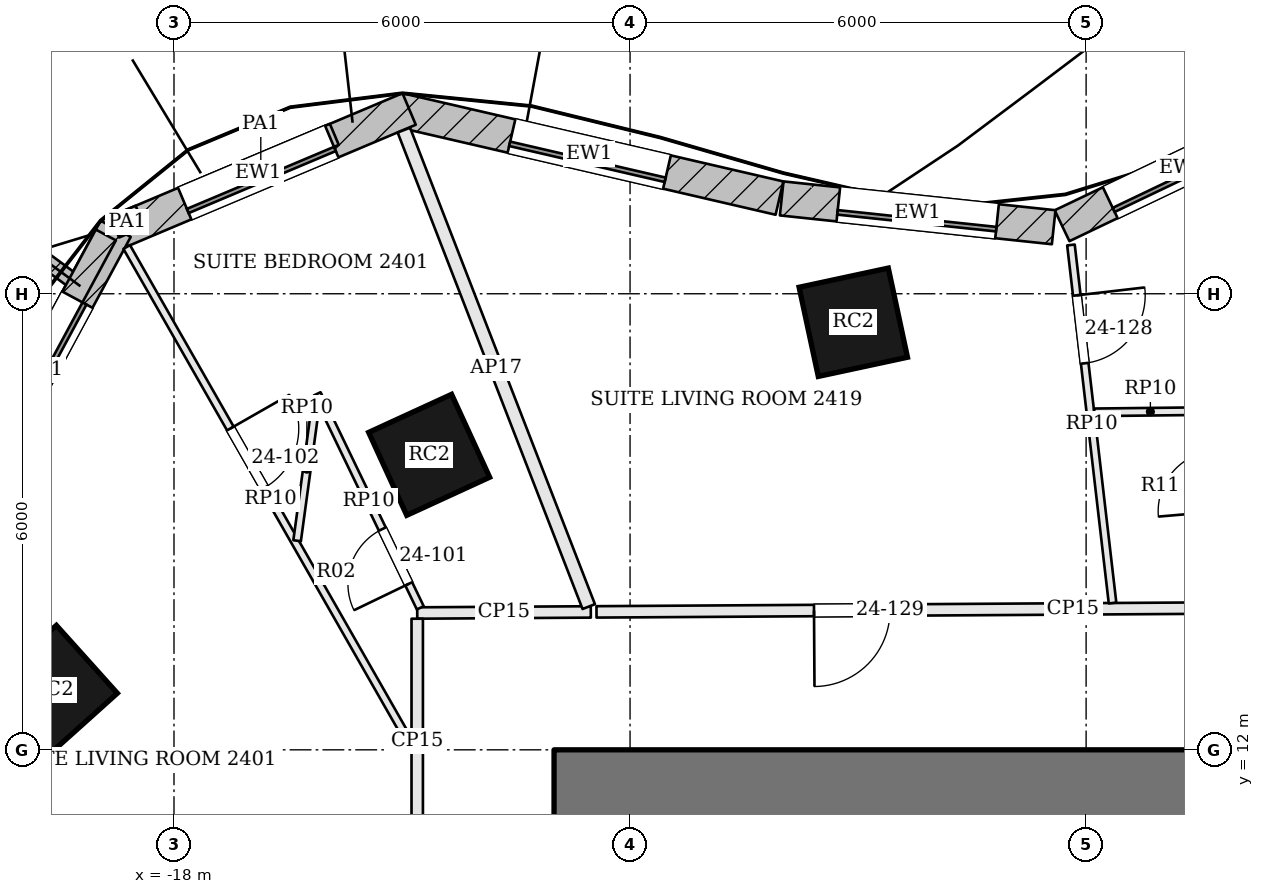
"""IFC4 building model, lengths in metres.
Left out: names, types, materials, properties, quantities, classifications, styles, units other than length and angle.
Written with IfcOpenShell. Run it as: python <this file> out.ifc"""

import sys

from ifc_helpers import new_model, si_unit, direction, frame, frame_2d, origin, origin_2d, place, context, subcontext, project, spatial, rectangle, extrude, element, fill, save


model = new_model("IFC4")
c1 = context("Model", 3, precision=1e-05, world=origin(), true_north=direction((0.0, 1.0)))
c2 = subcontext(c1, "Body", "Model", "MODEL_VIEW")
j1 = project(units=[si_unit("LENGTHUNIT", "METRE"), si_unit("PLANEANGLEUNIT", "RADIAN")], contexts=[c1])
p1 = place(None, origin())
s1 = spatial("IfcSite", under=j1, at=p1, CompositionType="ELEMENT")
p2 = place(p1, origin())
s2 = spatial("IfcBuilding", under=s1, at=p2, CompositionType="ELEMENT")
p3 = place(p2, frame((0.0, 0.0, 103.2)))
s3 = spatial("IfcBuildingStorey", under=s2, at=p3, CompositionType="ELEMENT", Elevation=103.2)
p4 = place(p3, frame((-13.0, 11.45, 0.0), z_axis=(0.0, 0.0, 1.0), x_axis=(1.0, 0.0, 0.0)))
e1 = element("IfcWall", 1, at=p4, inside=s3, PredefinedType="SHEAR", context=c2, shape_type="SweptSolid", body=[
    extrude(rectangle(XDim=26.0, YDim=1.1, at=frame_2d((13.0, 0.0))), origin(), (0.0, 0.0, 1.0), 3.6),
])
p5 = place(p4, frame((9.225, 0.0, 0.0)))
e2 = element("IfcOpeningElement", 2, at=p5, cuts=e1, PredefinedType="OPENING", context=c2, shape_type="SweptSolid", body=[
    extrude(rectangle(XDim=1.0, YDim=2.1, at=frame_2d((0.5, 1.05))), frame((0.0, 0.56, 0.0), z_axis=(0.0, -1.0, 0.0), x_axis=(1.0, 0.0, 0.0)), (0.0, 0.0, 1.0), 1.12),
])
p6 = place(p4, frame((12.225, 0.0, 0.0)))
e3 = element("IfcOpeningElement", 3, at=p6, cuts=e1, PredefinedType="OPENING", context=c2, shape_type="SweptSolid", body=[
    extrude(rectangle(XDim=0.7, YDim=2.1, at=frame_2d((0.35, 1.05))), frame((0.0, 0.56, 0.0), z_axis=(0.0, -1.0, 0.0), x_axis=(1.0, 0.0, 0.0)), (0.0, 0.0, 1.0), 1.12),
])
p7 = place(p4, frame((14.125, 0.0, 0.0)))
e4 = element("IfcOpeningElement", 4, at=p7, cuts=e1, PredefinedType="OPENING", context=c2, shape_type="SweptSolid", body=[
    extrude(rectangle(XDim=1.0, YDim=2.1, at=frame_2d((0.5, 1.05))), frame((0.0, 0.56, 0.0), z_axis=(0.0, -1.0, 0.0), x_axis=(1.0, 0.0, 0.0)), (0.0, 0.0, 1.0), 1.12),
])
p8 = place(p4, frame((15.65, 0.0, 0.0)))
e5 = element("IfcOpeningElement", 5, at=p8, cuts=e1, PredefinedType="OPENING", context=c2, shape_type="SweptSolid", body=[
    extrude(rectangle(XDim=1.0, YDim=2.1, at=frame_2d((0.5, 1.05))), frame((0.0, 0.56, 0.0), z_axis=(0.0, -1.0, 0.0), x_axis=(1.0, 0.0, 0.0)), (0.0, 0.0, 1.0), 1.12),
])
for number, where, z_axis, x_axis in (
    (6, (-9.063, 17.625, 0.0), (0.0, 0.0, 1.0), (-0.978, -0.21, 0.0)),
    (7, (-14.643, 15.881, 0.0), (0.0, 0.0, 1.0), (-0.909, -0.417, 0.0)),
    (8, (-19.593, 12.79, 0.0), (0.0, 0.0, 1.0), (-0.744, -0.668, 0.0)),
):
    element("IfcColumn", number, at=place(p3, frame(where, z_axis=z_axis, x_axis=x_axis)), inside=s3, PredefinedType="COLUMN", context=c2, shape_type="SweptSolid", body=[
        extrude(rectangle(XDim=1.2, YDim=1.2, at=origin_2d()), origin(), (0.0, 0.0, 1.0), 3.6),
    ])
p9 = place(p3, frame((-3.154, 20.406, 0.0), z_axis=(0.0, 0.0, 1.0), x_axis=(-0.902333313, -0.431038968367, 0.0)))
e9 = element("IfcWall", 9, at=p9, inside=s3, PredefinedType="SOLIDWALL", context=c2, shape_type="SweptSolid", body=[
    extrude(rectangle(XDim=3.505, YDim=0.45, at=frame_2d((1.753, 0.0))), origin(), (0.0, 0.0, 1.0), 3.4),
])
p10 = place(p9, frame((0.703, 0.0, 0.9)))
e10 = element("IfcOpeningElement", 10, at=p10, cuts=e9, PredefinedType="OPENING", context=c2, shape_type="SweptSolid", body=[
    extrude(rectangle(XDim=2.1, YDim=2.0, at=frame_2d((1.05, 1.0))), frame((0.0, 0.235, 0.0), z_axis=(0.0, -1.0, 0.0), x_axis=(1.0, 0.0, 0.0)), (0.0, 0.0, 1.0), 0.47),
])
p11 = place(p3, frame((-6.427, 18.875, 0.0), z_axis=(0.0, 0.0, 1.0), x_axis=(-0.994433468803, 0.10536638992, 0.0)))
e11 = element("IfcWall", 11, at=p11, inside=s3, PredefinedType="SOLIDWALL", context=c2, shape_type="SweptSolid", body=[
    extrude(rectangle(XDim=3.598, YDim=0.45, at=frame_2d((1.799, 0.0))), origin(), (0.0, 0.0, 1.0), 3.4),
])
p12 = place(p11, frame((0.749, 0.0, 0.9)))
e12 = element("IfcOpeningElement", 12, at=p12, cuts=e11, PredefinedType="OPENING", context=c2, shape_type="SweptSolid", body=[
    extrude(rectangle(XDim=2.1, YDim=2.0, at=frame_2d((1.05, 1.0))), frame((0.0, 0.235, 0.0), z_axis=(0.0, -1.0, 0.0), x_axis=(1.0, 0.0, 0.0)), (0.0, 0.0, 1.0), 0.47),
])
p13 = place(p3, frame((-10.034, 19.259, 0.0), z_axis=(0.0, 0.0, 1.0), x_axis=(-0.974223567844, 0.225584662283, 0.0)))
e13 = element("IfcWall", 13, at=p13, inside=s3, PredefinedType="SOLIDWALL", context=c2, shape_type="SweptSolid", body=[
    extrude(rectangle(XDim=5.139, YDim=0.45, at=frame_2d((2.569, 0.0))), origin(), (0.0, 0.0, 1.0), 3.4),
])
p14 = place(p13, frame((1.519, 0.0, 0.9)))
e14 = element("IfcOpeningElement", 14, at=p14, cuts=e13, PredefinedType="OPENING", context=c2, shape_type="SweptSolid", body=[
    extrude(rectangle(XDim=2.1, YDim=2.0, at=frame_2d((1.05, 1.0))), frame((0.0, 0.235, 0.0), z_axis=(0.0, -1.0, 0.0), x_axis=(1.0, 0.0, 0.0)), (0.0, 0.0, 1.0), 0.47),
])
p15 = place(p3, frame((-14.906, 20.431, 0.0), z_axis=(0.0, 0.0, 1.0), x_axis=(-0.921435803521, -0.388530642279, 0.0)))
e15 = element("IfcWall", 15, at=p15, inside=s3, PredefinedType="SOLIDWALL", context=c2, shape_type="SweptSolid", body=[
    extrude(rectangle(XDim=4.309, YDim=0.45, at=frame_2d((2.154, 0.0))), origin(), (0.0, 0.0, 1.0), 3.4),
])
p16 = place(p15, frame((1.104, 0.0, 0.9)))
e16 = element("IfcOpeningElement", 16, at=p16, cuts=e15, PredefinedType="OPENING", context=c2, shape_type="SweptSolid", body=[
    extrude(rectangle(XDim=2.1, YDim=2.0, at=frame_2d((1.05, 1.0))), frame((0.0, 0.235, 0.0), z_axis=(0.0, -1.0, 0.0), x_axis=(1.0, 0.0, 0.0)), (0.0, 0.0, 1.0), 0.47),
])
p17 = place(p3, frame((-18.767, 18.854, 0.0), z_axis=(0.0, 0.0, 1.0), x_axis=(-0.474475888716, -0.880268499395, 0.0)))
e17 = element("IfcWall", 17, at=p17, inside=s3, PredefinedType="SOLIDWALL", context=c2, shape_type="SweptSolid", body=[
    extrude(rectangle(XDim=4.219, YDim=0.45, at=frame_2d((2.11, 0.0))), origin(), (0.0, 0.0, 1.0), 3.4),
])
p18 = place(p17, frame((1.06, 0.0, 0.9)))
e18 = element("IfcOpeningElement", 18, at=p18, cuts=e17, PredefinedType="OPENING", context=c2, shape_type="SweptSolid", body=[
    extrude(rectangle(XDim=2.1, YDim=2.0, at=frame_2d((1.05, 1.0))), frame((0.0, 0.235, 0.0), z_axis=(0.0, -1.0, 0.0), x_axis=(1.0, 0.0, 0.0)), (0.0, 0.0, 1.0), 0.47),
])
p19 = place(p3, frame((-19.231, 18.099, 0.0), z_axis=(0.0, 0.0, 1.0), x_axis=(-0.806085538754, 0.591799040394, 0.0)))
e19 = element("IfcWall", 19, at=p19, inside=s3, PredefinedType="SOLIDWALL", context=c2, shape_type="SweptSolid", body=[
    extrude(rectangle(XDim=1.75, YDim=0.2, at=frame_2d((0.875, 0.0))), origin(), (0.0, 0.0, 1.0), 3.4),
])
p20 = place(p3, frame((-15.891, 20.097, 3.6), z_axis=(0.0, 0.0, 1.0), x_axis=(-0.921468908678, -0.388452121038, 0.0)))
e20 = element("IfcWall", 20, at=p20, inside=s3, PredefinedType="PARAPET", context=c2, shape_type="SweptSolid", body=[
    extrude(rectangle(XDim=2.099, YDim=0.3, at=frame_2d((1.05, 0.0))), origin(), (0.0, 0.0, 1.0), 1.1),
])
p21 = place(p3, frame((-18.446, 19.02, 3.6), z_axis=(0.0, 0.0, 1.0), x_axis=(-0.921356634102, -0.388718346358, 0.0)))
e21 = element("IfcWall", 21, at=p21, inside=s3, PredefinedType="PARAPET", context=c2, shape_type="SweptSolid", body=[
    extrude(rectangle(XDim=0.363, YDim=0.3, at=frame_2d((0.182, 0.0))), origin(), (0.0, 0.0, 1.0), 1.1),
])
p22 = place(p3, frame((-18.896, 18.773, 3.6), z_axis=(0.0, 0.0, 1.0), x_axis=(-0.474444905835, -0.880285198857, 0.0)))
e22 = element("IfcWall", 22, at=p22, inside=s3, PredefinedType="PARAPET", context=c2, shape_type="SweptSolid", body=[
    extrude(rectangle(XDim=4.05, YDim=0.3, at=frame_2d((2.025, 0.0))), origin(), (0.0, 0.0, 1.0), 1.1),
])
p23 = place(p3, frame((-12.516, 13.814, 0.0), z_axis=(0.0, 0.0, 1.0), x_axis=(-0.999980777107, -0.006200436719, 0.0)))
e23 = element("IfcWall", 23, at=p23, inside=s3, PredefinedType="PARTITIONING", context=c2, shape_type="SweptSolid", body=[
    extrude(rectangle(XDim=2.284, YDim=0.15, at=frame_2d((1.142, 0.0))), origin(), (0.0, 0.0, 1.0), 2.784),
])
p24 = place(p3, frame((-14.8, 13.725, 0.0), z_axis=(0.0, 0.0, 1.0), x_axis=(0.0, -1.0, 0.0)))
e24 = element("IfcWall", 24, at=p24, inside=s3, PredefinedType="PARTITIONING", context=c2, shape_type="SweptSolid", body=[
    extrude(rectangle(XDim=3.228, YDim=0.15, at=frame_2d((1.614, 0.0))), origin(), (0.0, 0.0, 1.0), 2.784),
])
p25 = place(p3, frame((-14.976, 20.153, 0.0), z_axis=(0.0, 0.0, 1.0), x_axis=(0.361736544099, -0.932280361621, 0.0)))
e25 = element("IfcWall", 25, at=p25, inside=s3, PredefinedType="PARTITIONING", context=c2, shape_type="SweptSolid", body=[
    extrude(rectangle(XDim=6.724, YDim=0.175, at=frame_2d((3.362, 0.0))), origin(), (0.0, 0.0, 1.0), 2.784),
])
p26 = place(p3, frame((0.098, 13.893, 0.0), z_axis=(0.0, 0.0, 1.0), x_axis=(-0.999980712681, -0.006210818468, 0.0)))
e26 = element("IfcWall", 26, at=p26, inside=s3, PredefinedType="PARTITIONING", context=c2, shape_type="SweptSolid", body=[
    extrude(rectangle(XDim=12.54, YDim=0.15, at=frame_2d((6.27, 0.0))), origin(), (0.0, 0.0, 1.0), 2.784),
])
p27 = place(p26, frame((8.678, 0.0, 0.0)))
e27 = element("IfcOpeningElement", 27, at=p27, cuts=e26, PredefinedType="OPENING", context=c2, shape_type="SweptSolid", body=[
    extrude(rectangle(XDim=1.0, YDim=2.1, at=frame_2d((0.5, 1.05))), frame((0.0, 0.085, 0.0), z_axis=(0.0, -1.0, 0.0), x_axis=(1.0, 0.0, 0.0)), (0.0, 0.0, 1.0), 0.17),
])
p28 = place(p3, frame((-18.622, 18.615, 0.0), z_axis=(0.0, 0.0, 1.0), x_axis=(0.495932236656, -0.868361224748, 0.0)))
e28 = element("IfcWall", 28, at=p28, inside=s3, PredefinedType="PARTITIONING", context=c2, shape_type="SweptSolid", body=[
    extrude(rectangle(XDim=7.632, YDim=0.1, at=frame_2d((3.816, 0.0))), origin(), (0.0, 0.0, 1.0), 2.784),
])
p29 = place(p28, frame((2.75, 0.0, 0.0)))
e29 = element("IfcOpeningElement", 29, at=p29, cuts=e28, PredefinedType="OPENING", context=c2, shape_type="SweptSolid", body=[
    extrude(rectangle(XDim=0.9, YDim=2.4, at=frame_2d((0.45, 1.2))), frame((0.0, 0.06, 0.0), z_axis=(0.0, -1.0, 0.0), x_axis=(1.0, 0.0, 0.0)), (0.0, 0.0, 1.0), 0.12),
])
p30 = place(p3, frame((-14.76, 13.868, 0.0), z_axis=(0.0, 0.0, 1.0), x_axis=(-0.434165602695, 0.900833075234, 0.0)))
e30 = element("IfcWall", 30, at=p30, inside=s3, PredefinedType="PARTITIONING", context=c2, shape_type="SweptSolid", body=[
    extrude(rectangle(XDim=3.125, YDim=0.1, at=frame_2d((1.562, 0.0))), origin(), (0.0, 0.0, 1.0), 2.784),
])
p31 = place(p30, frame((0.35, 0.0, 0.0)))
e31 = element("IfcOpeningElement", 31, at=p31, cuts=e30, PredefinedType="OPENING", context=c2, shape_type="SweptSolid", body=[
    extrude(rectangle(XDim=0.8, YDim=2.1, at=frame_2d((0.4, 1.05))), frame((0.0, 0.06, 0.0), z_axis=(0.0, -1.0, 0.0), x_axis=(1.0, 0.0, 0.0)), (0.0, 0.0, 1.0), 0.12),
])
p32 = place(p3, frame((-16.124, 16.634, 0.0), z_axis=(0.0, 0.0, 1.0), x_axis=(-0.135050128955, -0.990838767242, 0.0)))
e32 = element("IfcWall", 32, at=p32, inside=s3, PredefinedType="PARTITIONING", context=c2, shape_type="SweptSolid", body=[
    extrude(rectangle(XDim=1.9, YDim=0.1, at=frame_2d((0.95, 0.0))), origin(), (0.0, 0.0, 1.0), 2.784),
])
p33 = place(p3, frame((-6.199, 18.642, 0.0), z_axis=(0.0, 0.0, 1.0), x_axis=(0.115374456255, -0.993322070048, 0.0)))
e33 = element("IfcWall", 33, at=p33, inside=s3, PredefinedType="PARTITIONING", context=c2, shape_type="SweptSolid", body=[
    extrude(rectangle(XDim=4.742, YDim=0.1, at=frame_2d((2.371, 0.0))), origin(), (0.0, 0.0, 1.0), 2.784),
])
p34 = place(p33, frame((0.667, 0.0, 0.0)))
e34 = element("IfcOpeningElement", 34, at=p34, cuts=e33, PredefinedType="OPENING", context=c2, shape_type="SweptSolid", body=[
    extrude(rectangle(XDim=0.9, YDim=2.4, at=frame_2d((0.45, 1.2))), frame((0.0, 0.06, 0.0), z_axis=(0.0, -1.0, 0.0), x_axis=(1.0, 0.0, 0.0)), (0.0, 0.0, 1.0), 0.12),
])
p35 = place(p3, frame((-4.415, 16.456, 0.0), z_axis=(0.0, 0.0, 1.0), x_axis=(-0.999938785905, -0.011064557994, 0.0)))
e35 = element("IfcWall", 35, at=p35, inside=s3, PredefinedType="PARTITIONING", context=c2, shape_type="SweptSolid", body=[
    extrude(rectangle(XDim=1.478, YDim=0.1, at=frame_2d((0.739, 0.0))), origin(), (0.0, 0.0, 1.0), 2.784),
])
p36 = place(p10, origin())
e36 = element("IfcWindow", 36, at=p36, inside=s3, PartitioningType="SINGLE_PANEL", PredefinedType="WINDOW", context=c2, shape_type="SweptSolid", body=[
    extrude(rectangle(XDim=2.1, YDim=2.0, at=frame_2d((1.05, 1.0))), frame((0.0, 0.135, 0.0), z_axis=(0.0, -1.0, 0.0), x_axis=(1.0, 0.0, 0.0)), (0.0, 0.0, 1.0), 0.06),
])
fill(e10, e36)
p37 = place(p12, origin())
e37 = element("IfcWindow", 37, at=p37, inside=s3, PartitioningType="SINGLE_PANEL", PredefinedType="WINDOW", context=c2, shape_type="SweptSolid", body=[
    extrude(rectangle(XDim=2.1, YDim=2.0, at=frame_2d((1.05, 1.0))), frame((0.0, 0.135, 0.0), z_axis=(0.0, -1.0, 0.0), x_axis=(1.0, 0.0, 0.0)), (0.0, 0.0, 1.0), 0.06),
])
fill(e12, e37)
p38 = place(p14, origin())
e38 = element("IfcWindow", 38, at=p38, inside=s3, PartitioningType="SINGLE_PANEL", PredefinedType="WINDOW", context=c2, shape_type="SweptSolid", body=[
    extrude(rectangle(XDim=2.1, YDim=2.0, at=frame_2d((1.05, 1.0))), frame((0.0, 0.135, 0.0), z_axis=(0.0, -1.0, 0.0), x_axis=(1.0, 0.0, 0.0)), (0.0, 0.0, 1.0), 0.06),
])
fill(e14, e38)
p39 = place(p16, origin())
e39 = element("IfcWindow", 39, at=p39, inside=s3, PartitioningType="SINGLE_PANEL", PredefinedType="WINDOW", context=c2, shape_type="SweptSolid", body=[
    extrude(rectangle(XDim=2.1, YDim=2.0, at=frame_2d((1.05, 1.0))), frame((0.0, 0.135, 0.0), z_axis=(0.0, -1.0, 0.0), x_axis=(1.0, 0.0, 0.0)), (0.0, 0.0, 1.0), 0.06),
])
fill(e16, e39)
p40 = place(p18, origin())
e40 = element("IfcWindow", 40, at=p40, inside=s3, PartitioningType="SINGLE_PANEL", PredefinedType="WINDOW", context=c2, shape_type="SweptSolid", body=[
    extrude(rectangle(XDim=2.1, YDim=2.0, at=frame_2d((1.05, 1.0))), frame((0.0, 0.135, 0.0), z_axis=(0.0, -1.0, 0.0), x_axis=(1.0, 0.0, 0.0)), (0.0, 0.0, 1.0), 0.06),
])
fill(e18, e40)
p41 = place(p31, origin())
e41 = element("IfcDoor", 41, at=p41, inside=s3, OperationType="SINGLE_SWING_LEFT", PredefinedType="DOOR", context=c2, shape_type="SweptSolid", body=[
    extrude(rectangle(XDim=0.8, YDim=2.1, at=frame_2d((0.4, 1.05))), frame((0.0, 0.025, 0.0), z_axis=(0.0, -1.0, 0.0), x_axis=(1.0, 0.0, 0.0)), (0.0, 0.0, 1.0), 0.05),
])
fill(e31, e41)
p42 = place(p29, origin())
e42 = element("IfcDoor", 42, at=p42, inside=s3, OperationType="SINGLE_SWING_LEFT", PredefinedType="DOOR", context=c2, shape_type="SweptSolid", body=[
    extrude(rectangle(XDim=0.9, YDim=2.4, at=frame_2d((0.45, 1.2))), frame((0.0, 0.025, 0.0), z_axis=(0.0, -1.0, 0.0), x_axis=(1.0, 0.0, 0.0)), (0.0, 0.0, 1.0), 0.05),
])
fill(e29, e42)
p43 = place(p34, origin())
e43 = element("IfcDoor", 43, at=p43, inside=s3, OperationType="SINGLE_SWING_LEFT", PredefinedType="DOOR", context=c2, shape_type="SweptSolid", body=[
    extrude(rectangle(XDim=0.9, YDim=2.4, at=frame_2d((0.45, 1.2))), frame((0.0, 0.025, 0.0), z_axis=(0.0, -1.0, 0.0), x_axis=(1.0, 0.0, 0.0)), (0.0, 0.0, 1.0), 0.05),
])
fill(e34, e43)
p44 = place(p27, origin())
e44 = element("IfcDoor", 44, at=p44, inside=s3, OperationType="SINGLE_SWING_RIGHT", PredefinedType="DOOR", context=c2, shape_type="SweptSolid", body=[
    extrude(rectangle(XDim=1.0, YDim=2.1, at=frame_2d((0.5, 1.05))), frame((0.0, 0.025, 0.0), z_axis=(0.0, -1.0, 0.0), x_axis=(1.0, 0.0, 0.0)), (0.0, 0.0, 1.0), 0.05),
])
fill(e27, e44)
save(model, sys.argv[1])
